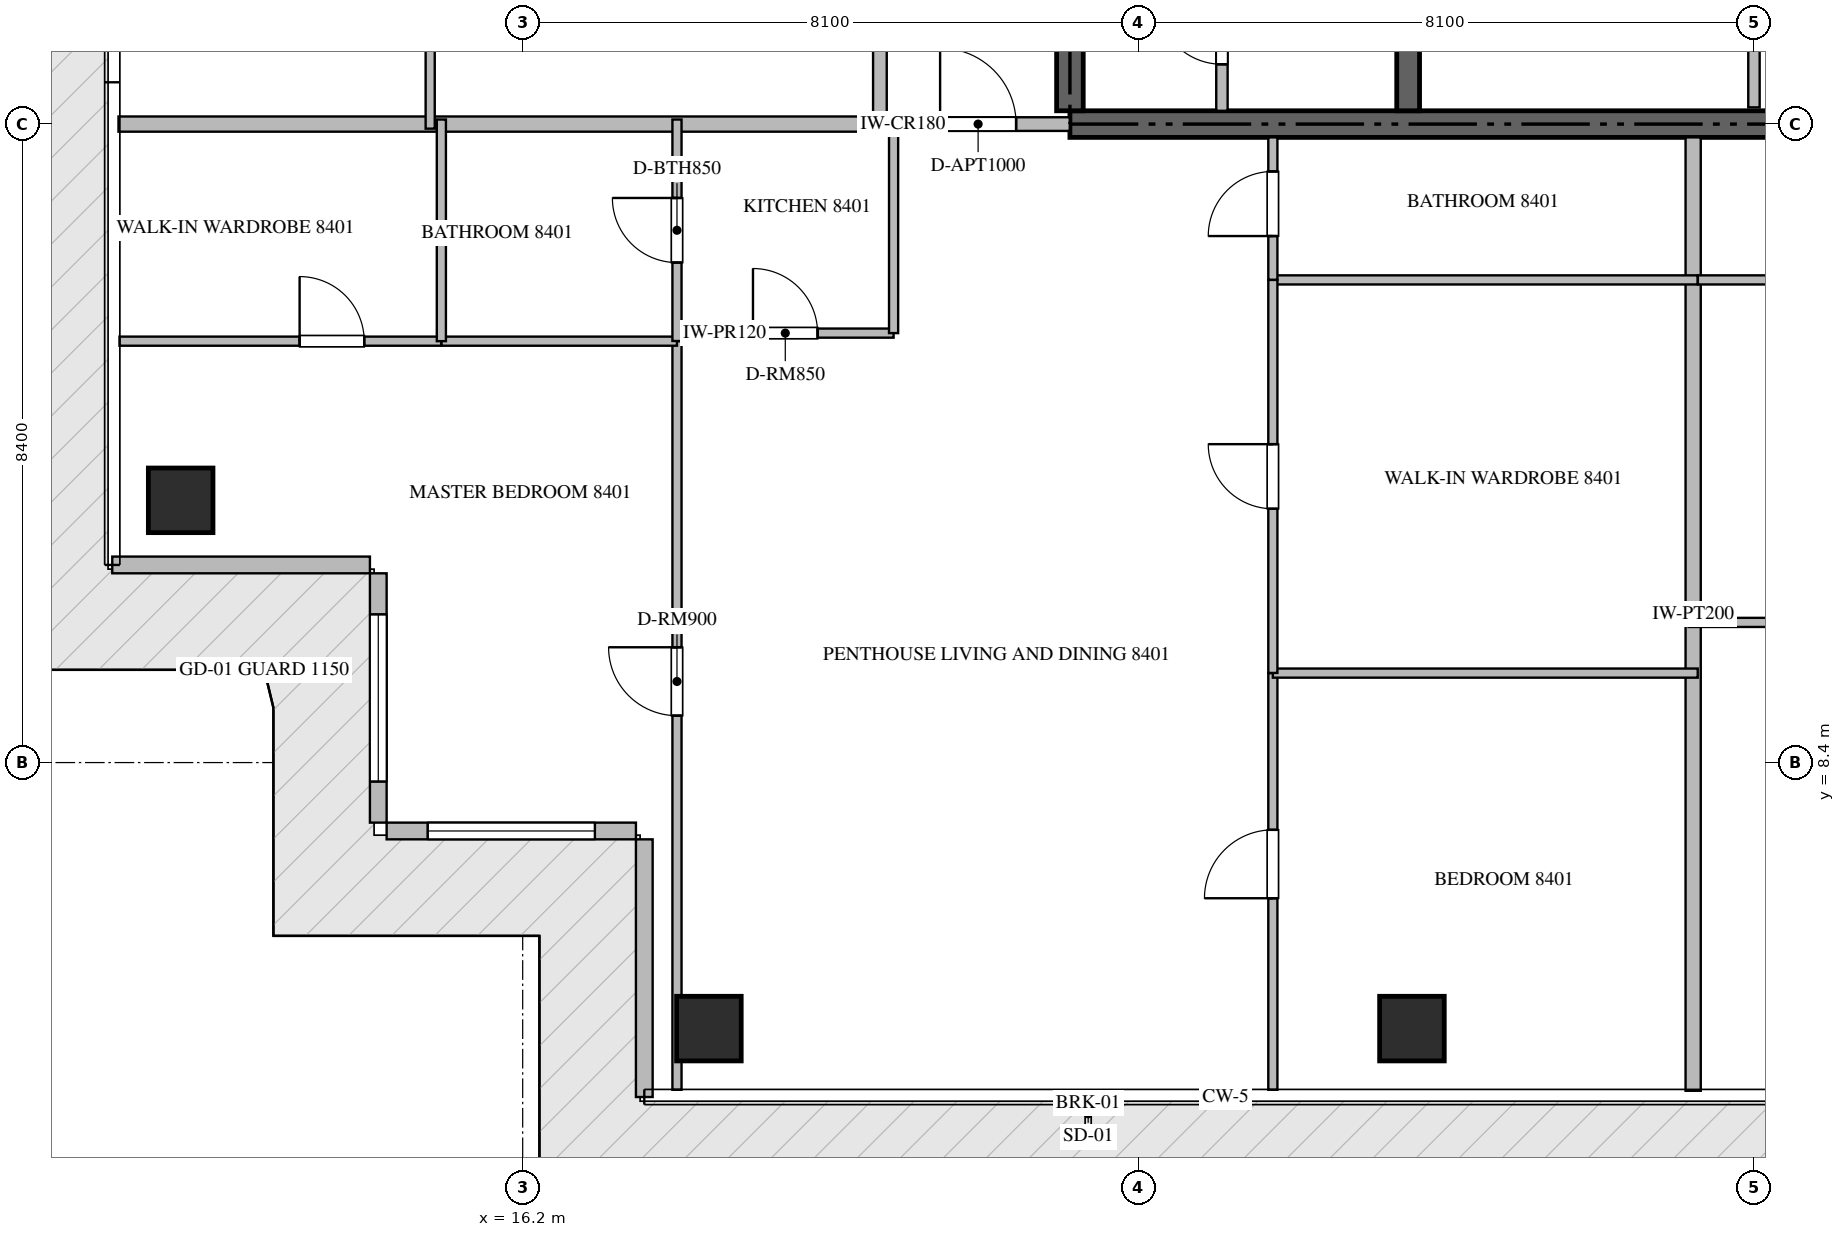
"""IFC4 building model, lengths in metres.
Left out: names, types, materials, properties, quantities, classifications, styles, units other than length and angle.
Written with IfcOpenShell. Run it as: python <this file> out.ifc"""

import sys

from ifc_helpers import new_model, si_unit, direction, frame, frame_2d, origin, origin_2d, place, context, subcontext, project, spatial, rectangle, extrude, source, transform, mapped, element, fill, save


model = new_model("IFC4")
c1 = context("Model", 3, precision=1e-05, world=origin(), true_north=direction((0.0, 1.0)))
c2 = subcontext(c1, "Body", "Model", "MODEL_VIEW")
j1 = project(units=[si_unit("LENGTHUNIT", "METRE"), si_unit("PLANEANGLEUNIT", "RADIAN")], contexts=[c1])
p1 = place(None, origin())
s1 = spatial("IfcSite", under=j1, at=p1, CompositionType="ELEMENT")
p2 = place(p1, origin())
s2 = spatial("IfcBuilding", under=s1, at=p2, CompositionType="ELEMENT")
p3 = place(p2, frame((0.0, 0.0, 338.0)))
s3 = spatial("IfcBuildingStorey", under=s2, at=p3, CompositionType="ELEMENT", Elevation=338.0)
p4 = place(p3, frame((23.4, 16.8, -0.44), z_axis=(0.0, 0.0, 1.0), x_axis=(1.0, 0.0, 0.0)))
e1 = element("IfcWall", 1, at=p4, inside=s3, PredefinedType="SHEAR", context=c2, shape_type="SweptSolid", body=[
    extrude(rectangle(XDim=18.0, YDim=0.35, at=frame_2d((9.0, 0.0))), origin(), (0.0, 0.0, 1.0), 4.228),
])
p5 = place(p3, frame((23.4, 16.975, -0.44), z_axis=(0.0, 0.0, 1.0), x_axis=(0.0, 1.0, 0.0)))
e2 = element("IfcWall", 2, at=p5, inside=s3, PredefinedType="SHEAR", context=c2, shape_type="SweptSolid", body=[
    extrude(rectangle(XDim=4.875, YDim=0.35, at=frame_2d((2.438, 0.0))), origin(), (0.0, 0.0, 1.0), 4.228),
])
p6 = place(p3, frame((27.85, 16.975, -0.44), z_axis=(0.0, 0.0, 1.0), x_axis=(0.0, 1.0, 0.0)))
e3 = element("IfcWall", 3, at=p6, inside=s3, PredefinedType="SHEAR", context=c2, shape_type="SweptSolid", body=[
    extrude(rectangle(XDim=4.875, YDim=0.3, at=frame_2d((2.438, 0.0))), origin(), (0.0, 0.0, 1.0), 4.228),
])
m1 = source(origin(), c2, "Body", "SweptSolid", [
    extrude(rectangle(XDim=0.85, YDim=0.85, at=origin_2d()), origin(), (0.0, 0.0, 1.0), 4.23),
])
for number, where, z_axis, x_axis in (
    (4, (18.65, 4.9, -0.44), (0.0, 0.0, 1.0), (1.0, 0.0, 0.0)),
    (5, (27.9, 4.9, -0.44), (0.0, 0.0, 1.0), (1.0, 0.0, 0.0)),
    (6, (11.7, 11.85, -0.44), (0.0, 0.0, 1.0), (1.0, 0.0, 0.0)),
):
    element("IfcColumn", number, at=place(p3, frame(where, z_axis=z_axis, x_axis=x_axis)), inside=s3, PredefinedType="COLUMN", context=c2, shape_type="MappedRepresentation", body=[
        mapped(m1, transform((0.0, 0.0, 0.0), scale=1.0)),
    ])
p7 = place(p3, frame((10.8, 11.0, 0.0), z_axis=(0.0, 0.0, 1.0), x_axis=(1.0, 0.0, 0.0)))
e7 = element("IfcWall", 7, at=p7, inside=s3, PredefinedType="ELEMENTEDWALL", context=c2, shape_type="SweptSolid", body=[
    extrude(rectangle(XDim=3.39, YDim=0.22, at=frame_2d((1.695, 0.0))), origin(), (0.0, 0.0, 1.0), 3.775),
])
p8 = place(p3, frame((14.3, 10.89, 0.0), z_axis=(0.0, 0.0, 1.0), x_axis=(0.0, -1.0, 0.0)))
e8 = element("IfcWall", 8, at=p8, inside=s3, PredefinedType="ELEMENTEDWALL", context=c2, shape_type="SweptSolid", body=[
    extrude(rectangle(XDim=3.28, YDim=0.22, at=frame_2d((1.64, 0.0))), origin(), (0.0, 0.0, 1.0), 3.775),
])
p9 = place(p8, frame((0.54, 0.0, 0.65)))
e9 = element("IfcOpeningElement", 9, at=p9, cuts=e8, PredefinedType="OPENING", context=c2, shape_type="SweptSolid", body=[
    extrude(rectangle(XDim=2.2, YDim=2.4, at=frame_2d((1.1, 1.2))), frame((0.0, 0.12, 0.0), z_axis=(0.0, -1.0, 0.0), x_axis=(1.0, 0.0, 0.0)), (0.0, 0.0, 1.0), 0.24),
])
p10 = place(p3, frame((14.41, 7.5, 0.0), z_axis=(0.0, 0.0, 1.0), x_axis=(1.0, 0.0, 0.0)))
e10 = element("IfcWall", 10, at=p10, inside=s3, PredefinedType="ELEMENTEDWALL", context=c2, shape_type="SweptSolid", body=[
    extrude(rectangle(XDim=3.28, YDim=0.22, at=frame_2d((1.64, 0.0))), origin(), (0.0, 0.0, 1.0), 3.775),
])
p11 = place(p10, frame((0.54, 0.0, 0.65)))
e11 = element("IfcOpeningElement", 11, at=p11, cuts=e10, PredefinedType="OPENING", context=c2, shape_type="SweptSolid", body=[
    extrude(rectangle(XDim=2.2, YDim=2.4, at=frame_2d((1.1, 1.2))), frame((0.0, 0.12, 0.0), z_axis=(0.0, -1.0, 0.0), x_axis=(1.0, 0.0, 0.0)), (0.0, 0.0, 1.0), 0.24),
])
p12 = place(p3, frame((17.8, 7.39, 0.0), z_axis=(0.0, 0.0, 1.0), x_axis=(0.0, -1.0, 0.0)))
e12 = element("IfcWall", 12, at=p12, inside=s3, PredefinedType="ELEMENTEDWALL", context=c2, shape_type="SweptSolid", body=[
    extrude(rectangle(XDim=3.39, YDim=0.22, at=frame_2d((1.695, 0.0))), origin(), (0.0, 0.0, 1.0), 3.775),
])
p13 = place(p3, frame((25.4, 16.975, 0.0), z_axis=(0.0, 0.0, 1.0), x_axis=(0.0, 1.0, 0.0)))
e13 = element("IfcWall", 13, at=p13, inside=s3, PredefinedType="PARTITIONING", context=c2, shape_type="SweptSolid", body=[
    extrude(rectangle(XDim=2.075, YDim=0.15, at=frame_2d((1.038, 0.0))), origin(), (0.0, 0.0, 1.0), 3.79),
])
p14 = place(p13, frame((0.612, 0.0, 0.0)))
e14 = element("IfcOpeningElement", 14, at=p14, cuts=e13, PredefinedType="OPENING", context=c2, shape_type="SweptSolid", body=[
    extrude(rectangle(XDim=0.85, YDim=2.1, at=frame_2d((0.425, 1.05))), frame((0.0, 0.085, 0.0), z_axis=(0.0, -1.0, 0.0), x_axis=(1.0, 0.0, 0.0)), (0.0, 0.0, 1.0), 0.17),
])
p15 = place(p3, frame((32.4, 17.02, 0.0), z_axis=(0.0, 0.0, 1.0), x_axis=(0.0, 1.0, 0.0)))
e15 = element("IfcWall", 15, at=p15, inside=s3, PredefinedType="PARTITIONING", context=c2, shape_type="SweptSolid", body=[
    extrude(rectangle(XDim=2.73, YDim=0.15, at=frame_2d((1.365, 0.0))), origin(), (0.0, 0.0, 1.0), 3.79),
])
p16 = place(p3, frame((31.6, 4.082, 0.0), z_axis=(0.0, 0.0, 1.0), x_axis=(0.0, 1.0, 0.0)))
e16 = element("IfcWall", 16, at=p16, inside=s3, PredefinedType="PARTITIONING", context=c2, shape_type="SweptSolid", body=[
    extrude(rectangle(XDim=12.543, YDim=0.2, at=frame_2d((6.271, 0.0))), origin(), (0.0, 0.0, 1.0), 3.79),
])
p17 = place(p3, frame((10.882, 16.8, 0.0), z_axis=(0.0, 0.0, 1.0), x_axis=(1.0, 0.0, 0.0)))
e17 = element("IfcWall", 17, at=p17, inside=s3, PredefinedType="PARTITIONING", context=c2, shape_type="SweptSolid", body=[
    extrude(rectangle(XDim=10.018, YDim=0.2, at=frame_2d((5.009, 0.0))), origin(), (0.0, 0.0, 1.0), 3.79),
])
p18 = place(p3, frame((20.902, 16.8, 0.0), z_axis=(0.0, 0.0, 1.0), x_axis=(1.0, 0.0, 0.0)))
e18 = element("IfcWall", 18, at=p18, inside=s3, PredefinedType="PARTITIONING", context=c2, shape_type="SweptSolid", body=[
    extrude(rectangle(XDim=2.496, YDim=0.18, at=frame_2d((1.248, 0.0))), origin(), (0.0, 0.0, 1.0), 3.79),
])
p19 = place(p18, frame((0.79, 0.0, 0.0)))
e19 = element("IfcOpeningElement", 19, at=p19, cuts=e18, PredefinedType="OPENING", context=c2, shape_type="SweptSolid", body=[
    extrude(rectangle(XDim=1.0, YDim=2.15, at=frame_2d((0.5, 1.075))), frame((0.0, 0.1, 0.0), z_axis=(0.0, -1.0, 0.0), x_axis=(1.0, 0.0, 0.0)), (0.0, 0.0, 1.0), 0.2),
])
p20 = place(p3, frame((20.9, 16.8, 0.0), z_axis=(0.0, 0.0, 1.0), x_axis=(0.0, 1.0, 0.0)))
e20 = element("IfcWall", 20, at=p20, inside=s3, PredefinedType="PARTITIONING", context=c2, shape_type="SweptSolid", body=[
    extrude(rectangle(XDim=16.8, YDim=0.18, at=frame_2d((8.4, 0.0))), origin(), (0.0, 0.0, 1.0), 3.79),
])
p21 = place(p20, frame((14.5, 0.0, 0.0)))
e21 = element("IfcOpeningElement", 21, at=p21, cuts=e20, PredefinedType="OPENING", context=c2, shape_type="SweptSolid", body=[
    extrude(rectangle(XDim=1.0, YDim=2.15, at=frame_2d((0.5, 1.075))), frame((0.0, 0.1, 0.0), z_axis=(0.0, -1.0, 0.0), x_axis=(1.0, 0.0, 0.0)), (0.0, 0.0, 1.0), 0.2),
])
p22 = place(p3, frame((18.23, 14.05, 0.0), z_axis=(0.0, 0.0, 1.0), x_axis=(1.0, 0.0, 0.0)))
e22 = element("IfcWall", 22, at=p22, inside=s3, PredefinedType="PARTITIONING", context=c2, shape_type="SweptSolid", body=[
    extrude(rectangle(XDim=2.85, YDim=0.12, at=frame_2d((1.425, 0.0))), origin(), (0.0, 0.0, 1.0), 3.79),
])
p23 = place(p22, frame((1.0, 0.0, 0.0)))
e23 = element("IfcOpeningElement", 23, at=p23, cuts=e22, PredefinedType="OPENING", context=c2, shape_type="SweptSolid", body=[
    extrude(rectangle(XDim=0.85, YDim=2.1, at=frame_2d((0.425, 1.05))), frame((0.0, 0.07, 0.0), z_axis=(0.0, -1.0, 0.0), x_axis=(1.0, 0.0, 0.0)), (0.0, 0.0, 1.0), 0.14),
])
p24 = place(p3, frame((21.08, 14.05, 0.0), z_axis=(0.0, 0.0, 1.0), x_axis=(0.0, 1.0, 0.0)))
e24 = element("IfcWall", 24, at=p24, inside=s3, PredefinedType="PARTITIONING", context=c2, shape_type="SweptSolid", body=[
    extrude(rectangle(XDim=2.81, YDim=0.12, at=frame_2d((1.405, 0.0))), origin(), (0.0, 0.0, 1.0), 3.79),
])
p25 = place(p3, frame((18.23, 4.095, 0.0), z_axis=(0.0, 0.0, 1.0), x_axis=(0.0, 1.0, 0.0)))
e25 = element("IfcWall", 25, at=p25, inside=s3, PredefinedType="PARTITIONING", context=c2, shape_type="SweptSolid", body=[
    extrude(rectangle(XDim=9.849, YDim=0.12, at=frame_2d((4.925, 0.0))), origin(), (0.0, 0.0, 1.0), 3.79),
])
p26 = place(p25, frame((4.922, 0.0, 0.0)))
e26 = element("IfcOpeningElement", 26, at=p26, cuts=e25, PredefinedType="OPENING", context=c2, shape_type="SweptSolid", body=[
    extrude(rectangle(XDim=0.9, YDim=2.1, at=frame_2d((0.45, 1.05))), frame((0.0, 0.07, 0.0), z_axis=(0.0, -1.0, 0.0), x_axis=(1.0, 0.0, 0.0)), (0.0, 0.0, 1.0), 0.14),
])
p27 = place(p3, frame((10.895, 13.944, 0.0), z_axis=(0.0, 0.0, 1.0), x_axis=(1.0, 0.0, 0.0)))
e27 = element("IfcWall", 27, at=p27, inside=s3, PredefinedType="PARTITIONING", context=c2, shape_type="SweptSolid", body=[
    extrude(rectangle(XDim=4.235, YDim=0.12, at=frame_2d((2.117, 0.0))), origin(), (0.0, 0.0, 1.0), 3.79),
])
p28 = place(p27, frame((2.37, 0.0, 0.0)))
e28 = element("IfcOpeningElement", 28, at=p28, cuts=e27, PredefinedType="OPENING", context=c2, shape_type="SweptSolid", body=[
    extrude(rectangle(XDim=0.85, YDim=2.1, at=frame_2d((0.425, 1.05))), frame((0.0, 0.07, 0.0), z_axis=(0.0, -1.0, 0.0), x_axis=(1.0, 0.0, 0.0)), (0.0, 0.0, 1.0), 0.14),
])
p29 = place(p3, frame((15.132, 13.944, 0.0), z_axis=(0.0, 0.0, 1.0), x_axis=(1.0, 0.0, 0.0)))
e29 = element("IfcWall", 29, at=p29, inside=s3, PredefinedType="PARTITIONING", context=c2, shape_type="SweptSolid", body=[
    extrude(rectangle(XDim=3.098, YDim=0.12, at=frame_2d((1.549, 0.0))), origin(), (0.0, 0.0, 1.0), 3.79),
])
p30 = place(p3, frame((15.13, 13.944, 0.0), z_axis=(0.0, 0.0, 1.0), x_axis=(0.0, 1.0, 0.0)))
e30 = element("IfcWall", 30, at=p30, inside=s3, PredefinedType="PARTITIONING", context=c2, shape_type="SweptSolid", body=[
    extrude(rectangle(XDim=2.916, YDim=0.12, at=frame_2d((1.458, 0.0))), origin(), (0.0, 0.0, 1.0), 3.79),
])
p31 = place(p3, frame((18.23, 13.946, 0.0), z_axis=(0.0, 0.0, 1.0), x_axis=(0.0, 1.0, 0.0)))
e31 = element("IfcWall", 31, at=p31, inside=s3, PredefinedType="PARTITIONING", context=c2, shape_type="SweptSolid", body=[
    extrude(rectangle(XDim=2.914, YDim=0.12, at=frame_2d((1.457, 0.0))), origin(), (0.0, 0.0, 1.0), 3.79),
])
p32 = place(p31, frame((1.032, 0.0, 0.0)))
e32 = element("IfcOpeningElement", 32, at=p32, cuts=e31, PredefinedType="OPENING", context=c2, shape_type="SweptSolid", body=[
    extrude(rectangle(XDim=0.85, YDim=2.1, at=frame_2d((0.425, 1.05))), frame((0.0, 0.07, 0.0), z_axis=(0.0, -1.0, 0.0), x_axis=(1.0, 0.0, 0.0)), (0.0, 0.0, 1.0), 0.14),
])
p33 = place(p3, frame((26.07, 4.095, 0.0), z_axis=(0.0, 0.0, 1.0), x_axis=(0.0, 1.0, 0.0)))
e33 = element("IfcWall", 33, at=p33, inside=s3, PredefinedType="PARTITIONING", context=c2, shape_type="SweptSolid", body=[
    extrude(rectangle(XDim=5.482, YDim=0.12, at=frame_2d((2.741, 0.0))), origin(), (0.0, 0.0, 1.0), 3.79),
])
p34 = place(p33, frame((2.52, 0.0, 0.0)))
e34 = element("IfcOpeningElement", 34, at=p34, cuts=e33, PredefinedType="OPENING", context=c2, shape_type="SweptSolid", body=[
    extrude(rectangle(XDim=0.9, YDim=2.1, at=frame_2d((0.45, 1.05))), frame((0.0, 0.07, 0.0), z_axis=(0.0, -1.0, 0.0), x_axis=(1.0, 0.0, 0.0)), (0.0, 0.0, 1.0), 0.14),
])
for number, where, z_axis, x_axis in (
    (35, (26.07, 9.577, 0.0), (0.0, 0.0, 1.0), (1.0, 0.0, 0.0)),
    (36, (26.07, 14.75, 0.0), (0.0, 0.0, 1.0), (1.0, 0.0, 0.0)),
):
    element("IfcWall", number, at=place(p3, frame(where, z_axis=z_axis, x_axis=x_axis)), inside=s3, PredefinedType="PARTITIONING", context=c2, shape_type="SweptSolid", body=[
        extrude(rectangle(XDim=5.59, YDim=0.12, at=frame_2d((2.795, 0.0))), origin(), (0.0, 0.0, 1.0), 3.79),
    ])
p35 = place(p3, frame((26.07, 9.579, 0.0), z_axis=(0.0, 0.0, 1.0), x_axis=(0.0, 1.0, 0.0)))
e37 = element("IfcWall", 37, at=p35, inside=s3, PredefinedType="PARTITIONING", context=c2, shape_type="SweptSolid", body=[
    extrude(rectangle(XDim=5.171, YDim=0.12, at=frame_2d((2.585, 0.0))), origin(), (0.0, 0.0, 1.0), 3.79),
])
p36 = place(p35, frame((2.16, 0.0, 0.0)))
e38 = element("IfcOpeningElement", 38, at=p36, cuts=e37, PredefinedType="OPENING", context=c2, shape_type="SweptSolid", body=[
    extrude(rectangle(XDim=0.85, YDim=2.1, at=frame_2d((0.425, 1.05))), frame((0.0, 0.07, 0.0), z_axis=(0.0, -1.0, 0.0), x_axis=(1.0, 0.0, 0.0)), (0.0, 0.0, 1.0), 0.14),
])
p37 = place(p3, frame((26.07, 14.752, 0.0), z_axis=(0.0, 0.0, 1.0), x_axis=(0.0, 1.0, 0.0)))
e39 = element("IfcWall", 39, at=p37, inside=s3, PredefinedType="PARTITIONING", context=c2, shape_type="SweptSolid", body=[
    extrude(rectangle(XDim=1.873, YDim=0.12, at=frame_2d((0.937, 0.0))), origin(), (0.0, 0.0, 1.0), 3.79),
])
p38 = place(p37, frame((0.575, 0.0, 0.0)))
e40 = element("IfcOpeningElement", 40, at=p38, cuts=e39, PredefinedType="OPENING", context=c2, shape_type="SweptSolid", body=[
    extrude(rectangle(XDim=0.85, YDim=2.1, at=frame_2d((0.425, 1.05))), frame((0.0, 0.07, 0.0), z_axis=(0.0, -1.0, 0.0), x_axis=(1.0, 0.0, 0.0)), (0.0, 0.0, 1.0), 0.14),
])
p39 = place(p3, frame((31.54, 10.244, 0.0), z_axis=(0.0, 0.0, 1.0), x_axis=(1.0, 0.0, 0.0)))
e41 = element("IfcWall", 41, at=p39, inside=s3, PredefinedType="PARTITIONING", context=c2, shape_type="SweptSolid", body=[
    extrude(rectangle(XDim=6.96, YDim=0.12, at=frame_2d((3.48, 0.0))), origin(), (0.0, 0.0, 1.0), 3.79),
])
p40 = place(p3, frame((31.662, 14.75, 0.0), z_axis=(0.0, 0.0, 1.0), x_axis=(1.0, 0.0, 0.0)))
e42 = element("IfcWall", 42, at=p40, inside=s3, PredefinedType="PARTITIONING", context=c2, shape_type="SweptSolid", body=[
    extrude(rectangle(XDim=6.838, YDim=0.12, at=frame_2d((3.419, 0.0))), origin(), (0.0, 0.0, 1.0), 3.79),
])
p41 = place(p3, frame((14.983, 16.74, 0.0), z_axis=(0.0, 0.0, 1.0), x_axis=(0.0, 1.0, 0.0)))
e43 = element("IfcWall", 43, at=p41, inside=s3, PredefinedType="PARTITIONING", context=c2, shape_type="SweptSolid", body=[
    extrude(rectangle(XDim=10.48, YDim=0.12, at=frame_2d((5.24, 0.0))), origin(), (0.0, 0.0, 1.0), 3.79),
])
m2 = source(origin(), c2, "Body", "SweptSolid", [
    extrude(rectangle(XDim=2.2, YDim=2.4, at=frame_2d((1.1, 1.2))), frame((0.0, 0.03, 0.0), z_axis=(0.0, -1.0, 0.0), x_axis=(1.0, 0.0, 0.0)), (0.0, 0.0, 1.0), 0.06),
])
p42 = place(p9, origin())
e44 = element("IfcWindow", 44, at=p42, inside=s3, PartitioningType="SINGLE_PANEL", PredefinedType="WINDOW", context=c2, shape_type="MappedRepresentation", body=[
    mapped(m2, transform((0.0, 0.0, 0.0), scale=1.0)),
])
fill(e9, e44)
p43 = place(p11, origin())
e45 = element("IfcWindow", 45, at=p43, inside=s3, PartitioningType="SINGLE_PANEL", PredefinedType="WINDOW", context=c2, shape_type="MappedRepresentation", body=[
    mapped(m2, transform((0.0, 0.0, 0.0), scale=1.0)),
])
fill(e11, e45)
m3 = source(origin(), c2, "Body", "SweptSolid", [
    extrude(rectangle(XDim=0.85, YDim=2.1, at=frame_2d((0.425, 1.05))), frame((0.0, 0.025, 0.0), z_axis=(0.0, -1.0, 0.0), x_axis=(1.0, 0.0, 0.0)), (0.0, 0.0, 1.0), 0.05),
])
p44 = place(p14, origin())
e46 = element("IfcDoor", 46, at=p44, inside=s3, OperationType="SINGLE_SWING_RIGHT", PredefinedType="DOOR", context=c2, shape_type="MappedRepresentation", body=[
    mapped(m3, transform((0.0, 0.0, 0.0), scale=1.0)),
])
fill(e14, e46)
m4 = source(origin(), c2, "Body", "SweptSolid", [
    extrude(rectangle(XDim=1.0, YDim=2.15, at=frame_2d((0.5, 1.075))), frame((0.0, 0.025, 0.0), z_axis=(0.0, -1.0, 0.0), x_axis=(1.0, 0.0, 0.0)), (0.0, 0.0, 1.0), 0.05),
])
p45 = place(p19, origin())
e47 = element("IfcDoor", 47, at=p45, inside=s3, OperationType="SINGLE_SWING_LEFT", PredefinedType="DOOR", context=c2, shape_type="MappedRepresentation", body=[
    mapped(m4, transform((0.0, 0.0, 0.0), scale=1.0)),
])
fill(e19, e47)
p46 = place(p23, origin())
e48 = element("IfcDoor", 48, at=p46, inside=s3, OperationType="SINGLE_SWING_LEFT", PredefinedType="DOOR", context=c2, shape_type="MappedRepresentation", body=[
    mapped(m3, transform((0.0, 0.0, 0.0), scale=1.0)),
])
fill(e23, e48)
m5 = source(origin(), c2, "Body", "SweptSolid", [
    extrude(rectangle(XDim=0.9, YDim=2.1, at=frame_2d((0.45, 1.05))), frame((0.0, 0.025, 0.0), z_axis=(0.0, -1.0, 0.0), x_axis=(1.0, 0.0, 0.0)), (0.0, 0.0, 1.0), 0.05),
])
p47 = place(p26, origin())
e49 = element("IfcDoor", 49, at=p47, inside=s3, OperationType="SINGLE_SWING_RIGHT", PredefinedType="DOOR", context=c2, shape_type="MappedRepresentation", body=[
    mapped(m5, transform((0.0, 0.0, 0.0), scale=1.0)),
])
fill(e26, e49)
p48 = place(p28, origin())
e50 = element("IfcDoor", 50, at=p48, inside=s3, OperationType="SINGLE_SWING_LEFT", PredefinedType="DOOR", context=c2, shape_type="MappedRepresentation", body=[
    mapped(m3, transform((0.0, 0.0, 0.0), scale=1.0)),
])
fill(e28, e50)
p49 = place(p32, origin())
e51 = element("IfcDoor", 51, at=p49, inside=s3, OperationType="SINGLE_SWING_RIGHT", PredefinedType="DOOR", context=c2, shape_type="MappedRepresentation", body=[
    mapped(m3, transform((0.0, 0.0, 0.0), scale=1.0)),
])
fill(e32, e51)
p50 = place(p34, origin())
e52 = element("IfcDoor", 52, at=p50, inside=s3, OperationType="SINGLE_SWING_LEFT", PredefinedType="DOOR", context=c2, shape_type="MappedRepresentation", body=[
    mapped(m5, transform((0.0, 0.0, 0.0), scale=1.0)),
])
fill(e34, e52)
p51 = place(p36, origin())
e53 = element("IfcDoor", 53, at=p51, inside=s3, OperationType="SINGLE_SWING_RIGHT", PredefinedType="DOOR", context=c2, shape_type="MappedRepresentation", body=[
    mapped(m3, transform((0.0, 0.0, 0.0), scale=1.0)),
])
fill(e38, e53)
p52 = place(p38, origin())
e54 = element("IfcDoor", 54, at=p52, inside=s3, OperationType="SINGLE_SWING_LEFT", PredefinedType="DOOR", context=c2, shape_type="MappedRepresentation", body=[
    mapped(m3, transform((0.0, 0.0, 0.0), scale=1.0)),
])
fill(e40, e54)
save(model, sys.argv[1])
